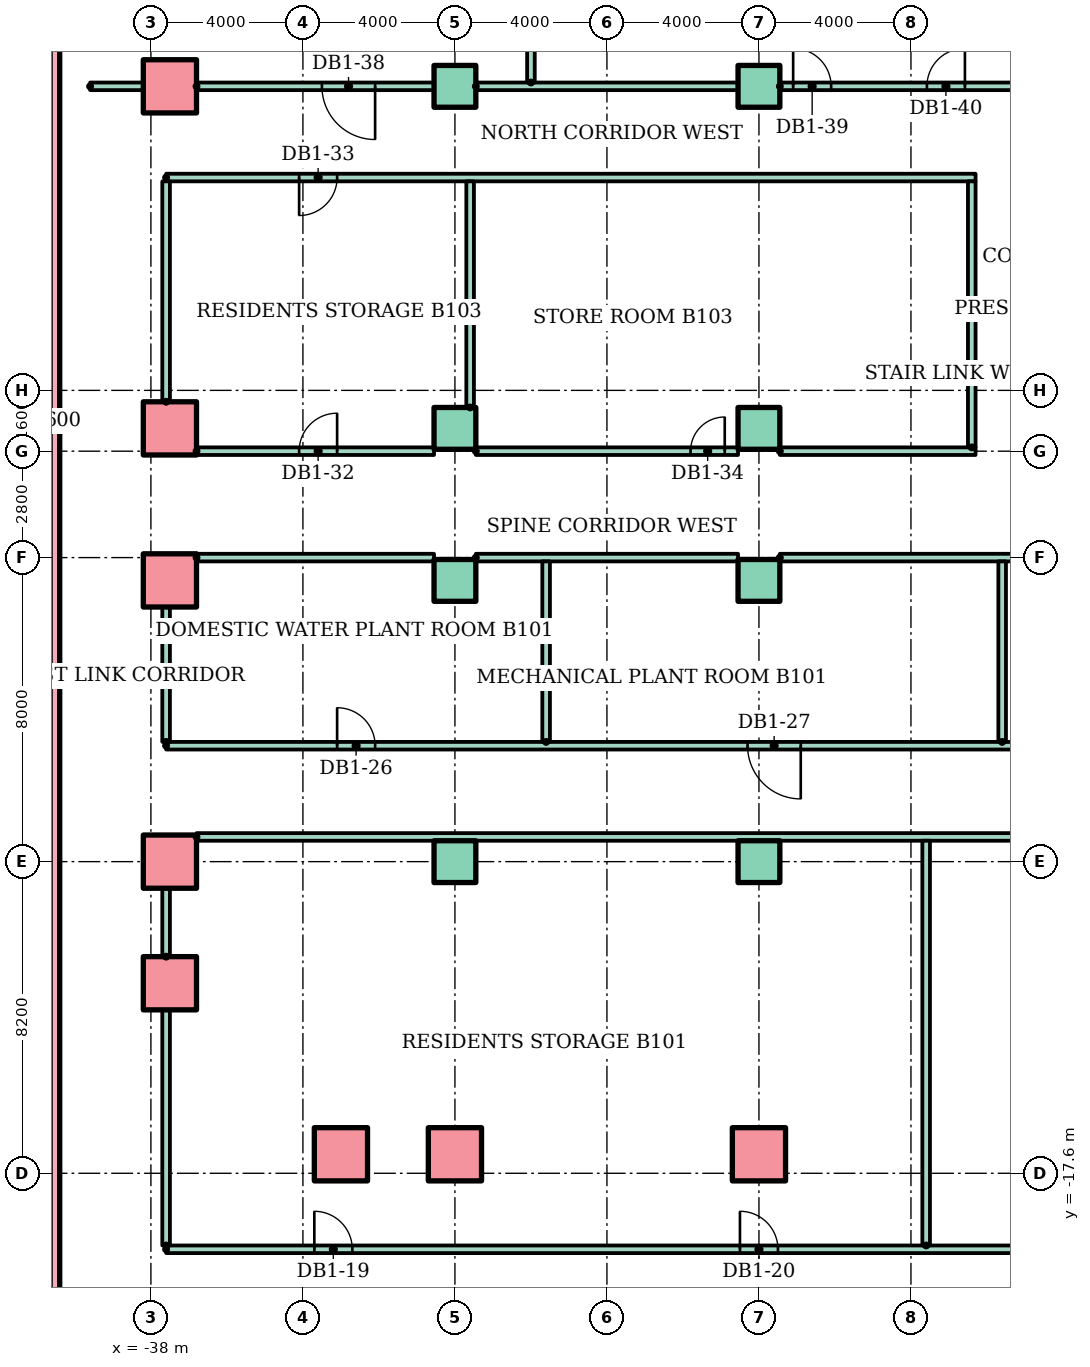
"""IFC4 building model, lengths in metres.
Left out: names, types, materials, properties, quantities, classifications, styles, units other than length and angle.
Written with IfcOpenShell. Run it as: python <this file> out.ifc"""

import sys

from ifc_helpers import new_model, si_unit, direction, frame, frame_2d, origin, origin_2d, place, context, subcontext, project, spatial, rectangle, hollow_rectangle, extrude, element, fill, save


model = new_model("IFC4")
c1 = context("Model", 3, precision=1e-05, world=origin(), true_north=direction((0.0, 1.0)))
c2 = subcontext(c1, "Body", "Model", "MODEL_VIEW")
j1 = project(units=[si_unit("LENGTHUNIT", "METRE"), si_unit("PLANEANGLEUNIT", "RADIAN")], contexts=[c1])
p1 = place(None, origin())
s1 = spatial("IfcSite", under=j1, at=p1, CompositionType="ELEMENT")
p2 = place(p1, origin())
s2 = spatial("IfcBuilding", under=s1, at=p2, CompositionType="ELEMENT")
p3 = place(p2, frame((0.0, 0.0, -5.0)))
s3 = spatial("IfcBuildingStorey", under=s2, at=p3, CompositionType="ELEMENT", Elevation=-5.0)
p4 = place(p3, frame((-40.7, -50.4, -0.35), z_axis=(0.0, 0.0, 1.0), x_axis=(0.0, 1.0, 0.0)))
e1 = element("IfcWall", 1, at=p4, inside=s3, PredefinedType="SOLIDWALL", context=c2, shape_type="SweptSolid", body=[
    extrude(rectangle(XDim=70.8, YDim=0.6, at=frame_2d((35.4, 0.0))), origin(), (0.0, 0.0, 1.0), 4.93),
])
for number, where in (
    (2, (-33.0, -17.1, 0.0)),
    (3, (-30.0, -17.1, 0.0)),
    (4, (-22.0, -17.1, 0.0)),
    (5, (-37.5, -12.6, 0.0)),
    (6, (-37.5, -9.4, 0.0)),
):
    element("IfcColumn", number, at=place(p3, frame(where)), inside=s3, PredefinedType="COLUMN", context=c2, shape_type="SweptSolid", body=[
        extrude(hollow_rectangle(XDim=1.4, YDim=1.4, WallThickness=0.08, at=origin_2d()), origin(), (0.0, 0.0, 1.0), 5.0),
    ])
for number, where in (
    (7, (-30.0, -9.4, 0.0)),
    (8, (-22.0, -9.4, 0.0)),
):
    element("IfcColumn", number, at=place(p3, frame(where)), inside=s3, PredefinedType="COLUMN", context=c2, shape_type="SweptSolid", body=[
        extrude(rectangle(XDim=1.1, YDim=1.1, at=origin_2d()), origin(), (0.0, 0.0, 1.0), 5.0),
    ])
p5 = place(p3, frame((-37.5, -2.0, 0.0)))
e9 = element("IfcColumn", 9, at=p5, inside=s3, PredefinedType="COLUMN", context=c2, shape_type="SweptSolid", body=[
    extrude(hollow_rectangle(XDim=1.4, YDim=1.4, WallThickness=0.08, at=origin_2d()), origin(), (0.0, 0.0, 1.0), 5.0),
])
for number, where in (
    (10, (-30.0, -2.0, 0.0)),
    (11, (-22.0, -2.0, 0.0)),
):
    element("IfcColumn", number, at=place(p3, frame(where)), inside=s3, PredefinedType="COLUMN", context=c2, shape_type="SweptSolid", body=[
        extrude(rectangle(XDim=1.1, YDim=1.1, at=origin_2d()), origin(), (0.0, 0.0, 1.0), 5.0),
    ])
p6 = place(p3, frame((-37.5, 2.0, 0.0)))
e12 = element("IfcColumn", 12, at=p6, inside=s3, PredefinedType="COLUMN", context=c2, shape_type="SweptSolid", body=[
    extrude(hollow_rectangle(XDim=1.4, YDim=1.4, WallThickness=0.08, at=origin_2d()), origin(), (0.0, 0.0, 1.0), 5.0),
])
for number, where in (
    (13, (-30.0, 2.0, 0.0)),
    (14, (-22.0, 2.0, 0.0)),
):
    element("IfcColumn", number, at=place(p3, frame(where)), inside=s3, PredefinedType="COLUMN", context=c2, shape_type="SweptSolid", body=[
        extrude(rectangle(XDim=1.1, YDim=1.1, at=origin_2d()), origin(), (0.0, 0.0, 1.0), 5.0),
    ])
p7 = place(p3, frame((-37.5, 11.0, 0.0)))
e15 = element("IfcColumn", 15, at=p7, inside=s3, PredefinedType="COLUMN", context=c2, shape_type="SweptSolid", body=[
    extrude(hollow_rectangle(XDim=1.4, YDim=1.4, WallThickness=0.08, at=origin_2d()), origin(), (0.0, 0.0, 1.0), 5.0),
])
for number, where in (
    (16, (-30.0, 11.0, 0.0)),
    (17, (-22.0, 11.0, 0.0)),
):
    element("IfcColumn", number, at=place(p3, frame(where)), inside=s3, PredefinedType="COLUMN", context=c2, shape_type="SweptSolid", body=[
        extrude(rectangle(XDim=1.1, YDim=1.1, at=origin_2d()), origin(), (0.0, 0.0, 1.0), 5.0),
    ])
p8 = place(p3, frame((-37.6, -19.6, 0.0)))
e18 = element("IfcWall", 18, at=p8, inside=s3, PredefinedType="PARTITIONING", context=c2, shape_type="SweptSolid", body=[
    extrude(rectangle(XDim=75.2, YDim=0.2, at=frame_2d((37.6, 0.0))), origin(), (0.0, 0.0, 1.0), 4.58),
])
p9 = place(p8, frame((3.9, 0.0, 0.0)))
e19 = element("IfcOpeningElement", 19, at=p9, cuts=e18, PredefinedType="OPENING", context=c2, shape_type="SweptSolid", body=[
    extrude(rectangle(XDim=1.0, YDim=2.1, at=frame_2d((0.5, 1.05))), frame((0.0, 0.11, 0.0), z_axis=(0.0, -1.0, 0.0), x_axis=(1.0, 0.0, 0.0)), (0.0, 0.0, 1.0), 0.22),
])
p10 = place(p8, frame((15.1, 0.0, 0.0)))
e20 = element("IfcOpeningElement", 20, at=p10, cuts=e18, PredefinedType="OPENING", context=c2, shape_type="SweptSolid", body=[
    extrude(rectangle(XDim=1.0, YDim=2.1, at=frame_2d((0.5, 1.05))), frame((0.0, 0.11, 0.0), z_axis=(0.0, -1.0, 0.0), x_axis=(1.0, 0.0, 0.0)), (0.0, 0.0, 1.0), 0.22),
])
p11 = place(p8, frame((23.9, 0.0, 0.0)))
e21 = element("IfcOpeningElement", 21, at=p11, cuts=e18, PredefinedType="OPENING", context=c2, shape_type="SweptSolid", body=[
    extrude(rectangle(XDim=1.0, YDim=2.1, at=frame_2d((0.5, 1.05))), frame((0.0, 0.11, 0.0), z_axis=(0.0, -1.0, 0.0), x_axis=(1.0, 0.0, 0.0)), (0.0, 0.0, 1.0), 0.22),
])
p12 = place(p8, frame((35.1, 0.0, 0.0)))
e22 = element("IfcOpeningElement", 22, at=p12, cuts=e18, PredefinedType="OPENING", context=c2, shape_type="SweptSolid", body=[
    extrude(rectangle(XDim=1.0, YDim=2.1, at=frame_2d((0.5, 1.05))), frame((0.0, 0.11, 0.0), z_axis=(0.0, -1.0, 0.0), x_axis=(1.0, 0.0, 0.0)), (0.0, 0.0, 1.0), 0.22),
])
p13 = place(p8, frame((44.5, 0.0, 0.0)))
e23 = element("IfcOpeningElement", 23, at=p13, cuts=e18, PredefinedType="OPENING", context=c2, shape_type="SweptSolid", body=[
    extrude(rectangle(XDim=1.0, YDim=2.1, at=frame_2d((0.5, 1.05))), frame((0.0, 0.11, 0.0), z_axis=(0.0, -1.0, 0.0), x_axis=(1.0, 0.0, 0.0)), (0.0, 0.0, 1.0), 0.22),
])
p14 = place(p8, frame((54.5, 0.0, 0.0)))
e24 = element("IfcOpeningElement", 24, at=p14, cuts=e18, PredefinedType="OPENING", context=c2, shape_type="SweptSolid", body=[
    extrude(rectangle(XDim=1.0, YDim=2.1, at=frame_2d((0.5, 1.05))), frame((0.0, 0.11, 0.0), z_axis=(0.0, -1.0, 0.0), x_axis=(1.0, 0.0, 0.0)), (0.0, 0.0, 1.0), 0.22),
])
p15 = place(p8, frame((67.15, 0.0, 0.0)))
e25 = element("IfcOpeningElement", 25, at=p15, cuts=e18, PredefinedType="OPENING", context=c2, shape_type="SweptSolid", body=[
    extrude(rectangle(XDim=0.9, YDim=2.1, at=frame_2d((0.45, 1.05))), frame((0.0, 0.11, 0.0), z_axis=(0.0, -1.0, 0.0), x_axis=(1.0, 0.0, 0.0)), (0.0, 0.0, 1.0), 0.22),
])
p16 = place(p3, frame((-36.8, -8.75, 0.0)))
e26 = element("IfcWall", 26, at=p16, inside=s3, PredefinedType="PARTITIONING", context=c2, shape_type="SweptSolid", body=[
    extrude(rectangle(XDim=73.6, YDim=0.2, at=frame_2d((36.8, 0.0))), origin(), (0.0, 0.0, 1.0), 4.58),
])
p17 = place(p3, frame((-37.6, -6.35, 0.0)))
e27 = element("IfcWall", 27, at=p17, inside=s3, PredefinedType="PARTITIONING", context=c2, shape_type="SweptSolid", body=[
    extrude(rectangle(XDim=75.2, YDim=0.2, at=frame_2d((37.6, 0.0))), origin(), (0.0, 0.0, 1.0), 4.58),
])
p18 = place(p17, frame((4.5, 0.0, 0.0)))
e28 = element("IfcOpeningElement", 28, at=p18, cuts=e27, PredefinedType="OPENING", context=c2, shape_type="SweptSolid", body=[
    extrude(rectangle(XDim=1.0, YDim=2.1, at=frame_2d((0.5, 1.05))), frame((0.0, 0.11, 0.0), z_axis=(0.0, -1.0, 0.0), x_axis=(1.0, 0.0, 0.0)), (0.0, 0.0, 1.0), 0.22),
])
p19 = place(p17, frame((15.3, 0.0, 0.0)))
e29 = element("IfcOpeningElement", 29, at=p19, cuts=e27, PredefinedType="OPENING", context=c2, shape_type="SweptSolid", body=[
    extrude(rectangle(XDim=1.4, YDim=2.1, at=frame_2d((0.7, 1.05))), frame((0.0, 0.11, 0.0), z_axis=(0.0, -1.0, 0.0), x_axis=(1.0, 0.0, 0.0)), (0.0, 0.0, 1.0), 0.22),
])
p20 = place(p17, frame((26.5, 0.0, 0.0)))
e30 = element("IfcOpeningElement", 30, at=p20, cuts=e27, PredefinedType="OPENING", context=c2, shape_type="SweptSolid", body=[
    extrude(rectangle(XDim=1.0, YDim=2.1, at=frame_2d((0.5, 1.05))), frame((0.0, 0.11, 0.0), z_axis=(0.0, -1.0, 0.0), x_axis=(1.0, 0.0, 0.0)), (0.0, 0.0, 1.0), 0.22),
])
p21 = place(p17, frame((36.55, 0.0, 0.0)))
e31 = element("IfcOpeningElement", 31, at=p21, cuts=e27, PredefinedType="OPENING", context=c2, shape_type="SweptSolid", body=[
    extrude(rectangle(XDim=0.9, YDim=2.1, at=frame_2d((0.45, 1.05))), frame((0.0, 0.11, 0.0), z_axis=(0.0, -1.0, 0.0), x_axis=(1.0, 0.0, 0.0)), (0.0, 0.0, 1.0), 0.22),
])
p22 = place(p17, frame((48.55, 0.0, 0.0)))
e32 = element("IfcOpeningElement", 32, at=p22, cuts=e27, PredefinedType="OPENING", context=c2, shape_type="SweptSolid", body=[
    extrude(rectangle(XDim=0.9, YDim=2.1, at=frame_2d((0.45, 1.05))), frame((0.0, 0.11, 0.0), z_axis=(0.0, -1.0, 0.0), x_axis=(1.0, 0.0, 0.0)), (0.0, 0.0, 1.0), 0.22),
])
p23 = place(p17, frame((65.1, 0.0, 0.0)))
e33 = element("IfcOpeningElement", 33, at=p23, cuts=e27, PredefinedType="OPENING", context=c2, shape_type="SweptSolid", body=[
    extrude(rectangle(XDim=1.0, YDim=2.1, at=frame_2d((0.5, 1.05))), frame((0.0, 0.11, 0.0), z_axis=(0.0, -1.0, 0.0), x_axis=(1.0, 0.0, 0.0)), (0.0, 0.0, 1.0), 0.22),
])
p24 = place(p3, frame((-36.8, -1.4, 0.0)))
e34 = element("IfcWall", 34, at=p24, inside=s3, PredefinedType="PARTITIONING", context=c2, shape_type="SweptSolid", body=[
    extrude(rectangle(XDim=6.25, YDim=0.2, at=frame_2d((3.125, 0.0))), origin(), (0.0, 0.0, 1.0), 4.58),
])
for number, where in (
    (35, (-29.45, -1.4, 0.0)),
    (36, (-21.45, -1.4, 0.0)),
):
    element("IfcWall", number, at=place(p3, frame(where)), inside=s3, PredefinedType="PARTITIONING", context=c2, shape_type="SweptSolid", body=[
        extrude(rectangle(XDim=6.9, YDim=0.2, at=frame_2d((3.45, 0.0))), origin(), (0.0, 0.0, 1.0), 4.58),
    ])
p25 = place(p3, frame((-36.8, 1.4, 0.0)))
e37 = element("IfcWall", 37, at=p25, inside=s3, PredefinedType="PARTITIONING", context=c2, shape_type="SweptSolid", body=[
    extrude(rectangle(XDim=6.25, YDim=0.2, at=frame_2d((3.125, 0.0))), origin(), (0.0, 0.0, 1.0), 4.58),
])
p26 = place(p25, frame((2.7, 0.0, 0.0)))
e38 = element("IfcOpeningElement", 38, at=p26, cuts=e37, PredefinedType="OPENING", context=c2, shape_type="SweptSolid", body=[
    extrude(rectangle(XDim=1.0, YDim=2.1, at=frame_2d((0.5, 1.05))), frame((0.0, 0.11, 0.0), z_axis=(0.0, -1.0, 0.0), x_axis=(1.0, 0.0, 0.0)), (0.0, 0.0, 1.0), 0.22),
])
p27 = place(p3, frame((-29.45, 1.4, 0.0)))
e39 = element("IfcWall", 39, at=p27, inside=s3, PredefinedType="PARTITIONING", context=c2, shape_type="SweptSolid", body=[
    extrude(rectangle(XDim=6.9, YDim=0.2, at=frame_2d((3.45, 0.0))), origin(), (0.0, 0.0, 1.0), 4.58),
])
p28 = place(p27, frame((5.65, 0.0, 0.0)))
e40 = element("IfcOpeningElement", 40, at=p28, cuts=e39, PredefinedType="OPENING", context=c2, shape_type="SweptSolid", body=[
    extrude(rectangle(XDim=0.9, YDim=2.1, at=frame_2d((0.45, 1.05))), frame((0.0, 0.11, 0.0), z_axis=(0.0, -1.0, 0.0), x_axis=(1.0, 0.0, 0.0)), (0.0, 0.0, 1.0), 0.22),
])
p29 = place(p3, frame((-21.45, 1.4, 0.0)))
e41 = element("IfcWall", 41, at=p29, inside=s3, PredefinedType="PARTITIONING", context=c2, shape_type="SweptSolid", body=[
    extrude(rectangle(XDim=5.15, YDim=0.2, at=frame_2d((2.575, 0.0))), origin(), (0.0, 0.0, 1.0), 4.58),
])
p30 = place(p3, frame((-37.6, 8.6, 0.0)))
e42 = element("IfcWall", 42, at=p30, inside=s3, PredefinedType="PARTITIONING", context=c2, shape_type="SweptSolid", body=[
    extrude(rectangle(XDim=21.3, YDim=0.2, at=frame_2d((10.65, 0.0))), origin(), (0.0, 0.0, 1.0), 4.58),
])
p31 = place(p30, frame((3.5, 0.0, 0.0)))
e43 = element("IfcOpeningElement", 43, at=p31, cuts=e42, PredefinedType="OPENING", context=c2, shape_type="SweptSolid", body=[
    extrude(rectangle(XDim=1.0, YDim=2.1, at=frame_2d((0.5, 1.05))), frame((0.0, 0.11, 0.0), z_axis=(0.0, -1.0, 0.0), x_axis=(1.0, 0.0, 0.0)), (0.0, 0.0, 1.0), 0.22),
])
p32 = place(p3, frame((-39.6, 11.0, 0.0)))
e44 = element("IfcWall", 44, at=p32, inside=s3, PredefinedType="PARTITIONING", context=c2, shape_type="SweptSolid", body=[
    extrude(rectangle(XDim=1.4, YDim=0.2, at=frame_2d((0.7, 0.0))), origin(), (0.0, 0.0, 1.0), 4.58),
])
p33 = place(p3, frame((-36.8, 11.0, 0.0)))
e45 = element("IfcWall", 45, at=p33, inside=s3, PredefinedType="PARTITIONING", context=c2, shape_type="SweptSolid", body=[
    extrude(rectangle(XDim=6.25, YDim=0.2, at=frame_2d((3.125, 0.0))), origin(), (0.0, 0.0, 1.0), 4.58),
])
p34 = place(p33, frame((3.3, 0.0, 0.0)))
e46 = element("IfcOpeningElement", 46, at=p34, cuts=e45, PredefinedType="OPENING", context=c2, shape_type="SweptSolid", body=[
    extrude(rectangle(XDim=1.4, YDim=2.1, at=frame_2d((0.7, 1.05))), frame((0.0, 0.11, 0.0), z_axis=(0.0, -1.0, 0.0), x_axis=(1.0, 0.0, 0.0)), (0.0, 0.0, 1.0), 0.22),
])
p35 = place(p3, frame((-29.45, 11.0, 0.0)))
e47 = element("IfcWall", 47, at=p35, inside=s3, PredefinedType="PARTITIONING", context=c2, shape_type="SweptSolid", body=[
    extrude(rectangle(XDim=6.9, YDim=0.2, at=frame_2d((3.45, 0.0))), origin(), (0.0, 0.0, 1.0), 4.58),
])
p36 = place(p3, frame((-21.45, 11.0, 0.0)))
e48 = element("IfcWall", 48, at=p36, inside=s3, PredefinedType="PARTITIONING", context=c2, shape_type="SweptSolid", body=[
    extrude(rectangle(XDim=7.45, YDim=0.2, at=frame_2d((3.725, 0.0))), origin(), (0.0, 0.0, 1.0), 4.58),
])
p37 = place(p36, frame((0.35, 0.0, 0.0)))
e49 = element("IfcOpeningElement", 49, at=p37, cuts=e48, PredefinedType="OPENING", context=c2, shape_type="SweptSolid", body=[
    extrude(rectangle(XDim=1.0, YDim=2.1, at=frame_2d((0.5, 1.05))), frame((0.0, 0.11, 0.0), z_axis=(0.0, -1.0, 0.0), x_axis=(1.0, 0.0, 0.0)), (0.0, 0.0, 1.0), 0.22),
])
p38 = place(p36, frame((3.87, 0.0, 0.0)))
e50 = element("IfcOpeningElement", 50, at=p38, cuts=e48, PredefinedType="OPENING", context=c2, shape_type="SweptSolid", body=[
    extrude(rectangle(XDim=1.0, YDim=2.1, at=frame_2d((0.5, 1.05))), frame((0.0, 0.11, 0.0), z_axis=(0.0, -1.0, 0.0), x_axis=(1.0, 0.0, 0.0)), (0.0, 0.0, 1.0), 0.22),
])
p39 = place(p3, frame((-37.6, -19.5, 0.0), z_axis=(0.0, 0.0, 1.0), x_axis=(0.0, 1.0, 0.0)))
e51 = element("IfcWall", 51, at=p39, inside=s3, PredefinedType="PARTITIONING", context=c2, shape_type="SweptSolid", body=[
    extrude(rectangle(XDim=6.2, YDim=0.2, at=frame_2d((3.1, 0.0))), origin(), (0.0, 0.0, 1.0), 4.58),
])
p40 = place(p3, frame((-37.6, -11.9, 0.0), z_axis=(0.0, 0.0, 1.0), x_axis=(0.0, 1.0, 0.0)))
e52 = element("IfcWall", 52, at=p40, inside=s3, PredefinedType="PARTITIONING", context=c2, shape_type="SweptSolid", body=[
    extrude(rectangle(XDim=1.8, YDim=0.2, at=frame_2d((0.9, 0.0))), origin(), (0.0, 0.0, 1.0), 4.58),
])
p41 = place(p3, frame((-37.6, -6.25, 0.0), z_axis=(0.0, 0.0, 1.0), x_axis=(0.0, 1.0, 0.0)))
e53 = element("IfcWall", 53, at=p41, inside=s3, PredefinedType="PARTITIONING", context=c2, shape_type="SweptSolid", body=[
    extrude(rectangle(XDim=3.55, YDim=0.2, at=frame_2d((1.775, 0.0))), origin(), (0.0, 0.0, 1.0), 4.58),
])
p42 = place(p3, frame((-37.6, 2.7, 0.0), z_axis=(0.0, 0.0, 1.0), x_axis=(0.0, 1.0, 0.0)))
e54 = element("IfcWall", 54, at=p42, inside=s3, PredefinedType="PARTITIONING", context=c2, shape_type="SweptSolid", body=[
    extrude(rectangle(XDim=5.8, YDim=0.2, at=frame_2d((2.9, 0.0))), origin(), (0.0, 0.0, 1.0), 4.58),
])
p43 = place(p3, frame((-29.6, 2.55, 0.0), z_axis=(0.0, 0.0, 1.0), x_axis=(0.0, 1.0, 0.0)))
e55 = element("IfcWall", 55, at=p43, inside=s3, PredefinedType="PARTITIONING", context=c2, shape_type="SweptSolid", body=[
    extrude(rectangle(XDim=5.95, YDim=0.2, at=frame_2d((2.975, 0.0))), origin(), (0.0, 0.0, 1.0), 4.58),
])
p44 = place(p3, frame((-28.0, 11.1, 0.0), z_axis=(0.0, 0.0, 1.0), x_axis=(0.0, 1.0, 0.0)))
e56 = element("IfcWall", 56, at=p44, inside=s3, PredefinedType="PARTITIONING", context=c2, shape_type="SweptSolid", body=[
    extrude(rectangle(XDim=8.5, YDim=0.2, at=frame_2d((4.25, 0.0))), origin(), (0.0, 0.0, 1.0), 4.58),
])
p45 = place(p3, frame((-27.6, -6.25, 0.0), z_axis=(0.0, 0.0, 1.0), x_axis=(0.0, 1.0, 0.0)))
e57 = element("IfcWall", 57, at=p45, inside=s3, PredefinedType="PARTITIONING", context=c2, shape_type="SweptSolid", body=[
    extrude(rectangle(XDim=4.75, YDim=0.2, at=frame_2d((2.375, 0.0))), origin(), (0.0, 0.0, 1.0), 4.58),
])
p46 = place(p3, frame((-17.6, -19.5, 0.0), z_axis=(0.0, 0.0, 1.0), x_axis=(0.0, 1.0, 0.0)))
e58 = element("IfcWall", 58, at=p46, inside=s3, PredefinedType="PARTITIONING", context=c2, shape_type="SweptSolid", body=[
    extrude(rectangle(XDim=10.65, YDim=0.2, at=frame_2d((5.325, 0.0))), origin(), (0.0, 0.0, 1.0), 4.58),
])
p47 = place(p3, frame((-16.4, 1.5, 0.0), z_axis=(0.0, 0.0, 1.0), x_axis=(0.0, 1.0, 0.0)))
e59 = element("IfcWall", 59, at=p47, inside=s3, PredefinedType="PARTITIONING", context=c2, shape_type="SweptSolid", body=[
    extrude(rectangle(XDim=7.0, YDim=0.2, at=frame_2d((3.5, 0.0))), origin(), (0.0, 0.0, 1.0), 4.58),
])
p48 = place(p3, frame((-15.6, -6.25, 0.0), z_axis=(0.0, 0.0, 1.0), x_axis=(0.0, 1.0, 0.0)))
e60 = element("IfcWall", 60, at=p48, inside=s3, PredefinedType="PARTITIONING", context=c2, shape_type="SweptSolid", body=[
    extrude(rectangle(XDim=4.75, YDim=0.2, at=frame_2d((2.375, 0.0))), origin(), (0.0, 0.0, 1.0), 4.58),
])
p49 = place(p9, origin())
e61 = element("IfcDoor", 61, at=p49, inside=s3, OperationType="SINGLE_SWING_LEFT", PredefinedType="DOOR", context=c2, shape_type="SweptSolid", body=[
    extrude(rectangle(XDim=1.0, YDim=2.1, at=frame_2d((0.5, 1.05))), frame((0.0, 0.025, 0.0), z_axis=(0.0, -1.0, 0.0), x_axis=(1.0, 0.0, 0.0)), (0.0, 0.0, 1.0), 0.05),
])
fill(e19, e61)
p50 = place(p10, origin())
e62 = element("IfcDoor", 62, at=p50, inside=s3, OperationType="SINGLE_SWING_LEFT", PredefinedType="DOOR", context=c2, shape_type="SweptSolid", body=[
    extrude(rectangle(XDim=1.0, YDim=2.1, at=frame_2d((0.5, 1.05))), frame((0.0, 0.025, 0.0), z_axis=(0.0, -1.0, 0.0), x_axis=(1.0, 0.0, 0.0)), (0.0, 0.0, 1.0), 0.05),
])
fill(e20, e62)
p51 = place(p18, origin())
e63 = element("IfcDoor", 63, at=p51, inside=s3, OperationType="SINGLE_SWING_LEFT", PredefinedType="DOOR", context=c2, shape_type="SweptSolid", body=[
    extrude(rectangle(XDim=1.0, YDim=2.1, at=frame_2d((0.5, 1.05))), frame((0.0, 0.025, 0.0), z_axis=(0.0, -1.0, 0.0), x_axis=(1.0, 0.0, 0.0)), (0.0, 0.0, 1.0), 0.05),
])
fill(e28, e63)
p52 = place(p19, frame((1.4, 0.0, 0.0), z_axis=(0.0, 0.0, 1.0), x_axis=(-1.0, 0.0, 0.0)))
e64 = element("IfcDoor", 64, at=p52, inside=s3, OperationType="DOUBLE_DOOR_SINGLE_SWING", PredefinedType="DOOR", context=c2, shape_type="SweptSolid", body=[
    extrude(rectangle(XDim=1.4, YDim=2.1, at=frame_2d((0.7, 1.05))), frame((0.0, 0.025, 0.0), z_axis=(0.0, -1.0, 0.0), x_axis=(1.0, 0.0, 0.0)), (0.0, 0.0, 1.0), 0.05),
])
fill(e29, e64)
p53 = place(p26, origin())
e65 = element("IfcDoor", 65, at=p53, inside=s3, OperationType="SINGLE_SWING_RIGHT", PredefinedType="DOOR", context=c2, shape_type="SweptSolid", body=[
    extrude(rectangle(XDim=1.0, YDim=2.1, at=frame_2d((0.5, 1.05))), frame((0.0, 0.025, 0.0), z_axis=(0.0, -1.0, 0.0), x_axis=(1.0, 0.0, 0.0)), (0.0, 0.0, 1.0), 0.05),
])
fill(e38, e65)
p54 = place(p31, frame((1.0, 0.0, 0.0), z_axis=(0.0, 0.0, 1.0), x_axis=(-1.0, 0.0, 0.0)))
e66 = element("IfcDoor", 66, at=p54, inside=s3, OperationType="SINGLE_SWING_LEFT", PredefinedType="DOOR", context=c2, shape_type="SweptSolid", body=[
    extrude(rectangle(XDim=1.0, YDim=2.1, at=frame_2d((0.5, 1.05))), frame((0.0, 0.025, 0.0), z_axis=(0.0, -1.0, 0.0), x_axis=(1.0, 0.0, 0.0)), (0.0, 0.0, 1.0), 0.05),
])
fill(e43, e66)
p55 = place(p28, origin())
e67 = element("IfcDoor", 67, at=p55, inside=s3, OperationType="SINGLE_SWING_RIGHT", PredefinedType="DOOR", context=c2, shape_type="SweptSolid", body=[
    extrude(rectangle(XDim=0.9, YDim=2.1, at=frame_2d((0.45, 1.05))), frame((0.0, 0.025, 0.0), z_axis=(0.0, -1.0, 0.0), x_axis=(1.0, 0.0, 0.0)), (0.0, 0.0, 1.0), 0.05),
])
fill(e40, e67)
p56 = place(p34, frame((1.4, 0.0, 0.0), z_axis=(0.0, 0.0, 1.0), x_axis=(-1.0, 0.0, 0.0)))
e68 = element("IfcDoor", 68, at=p56, inside=s3, OperationType="DOUBLE_DOOR_SINGLE_SWING", PredefinedType="DOOR", context=c2, shape_type="SweptSolid", body=[
    extrude(rectangle(XDim=1.4, YDim=2.1, at=frame_2d((0.7, 1.05))), frame((0.0, 0.025, 0.0), z_axis=(0.0, -1.0, 0.0), x_axis=(1.0, 0.0, 0.0)), (0.0, 0.0, 1.0), 0.05),
])
fill(e46, e68)
p57 = place(p37, origin())
e69 = element("IfcDoor", 69, at=p57, inside=s3, OperationType="SINGLE_SWING_LEFT", PredefinedType="DOOR", context=c2, shape_type="SweptSolid", body=[
    extrude(rectangle(XDim=1.0, YDim=2.1, at=frame_2d((0.5, 1.05))), frame((0.0, 0.025, 0.0), z_axis=(0.0, -1.0, 0.0), x_axis=(1.0, 0.0, 0.0)), (0.0, 0.0, 1.0), 0.05),
])
fill(e49, e69)
p58 = place(p38, origin())
e70 = element("IfcDoor", 70, at=p58, inside=s3, OperationType="SINGLE_SWING_RIGHT", PredefinedType="DOOR", context=c2, shape_type="SweptSolid", body=[
    extrude(rectangle(XDim=1.0, YDim=2.1, at=frame_2d((0.5, 1.05))), frame((0.0, 0.025, 0.0), z_axis=(0.0, -1.0, 0.0), x_axis=(1.0, 0.0, 0.0)), (0.0, 0.0, 1.0), 0.05),
])
fill(e50, e70)
save(model, sys.argv[1])
